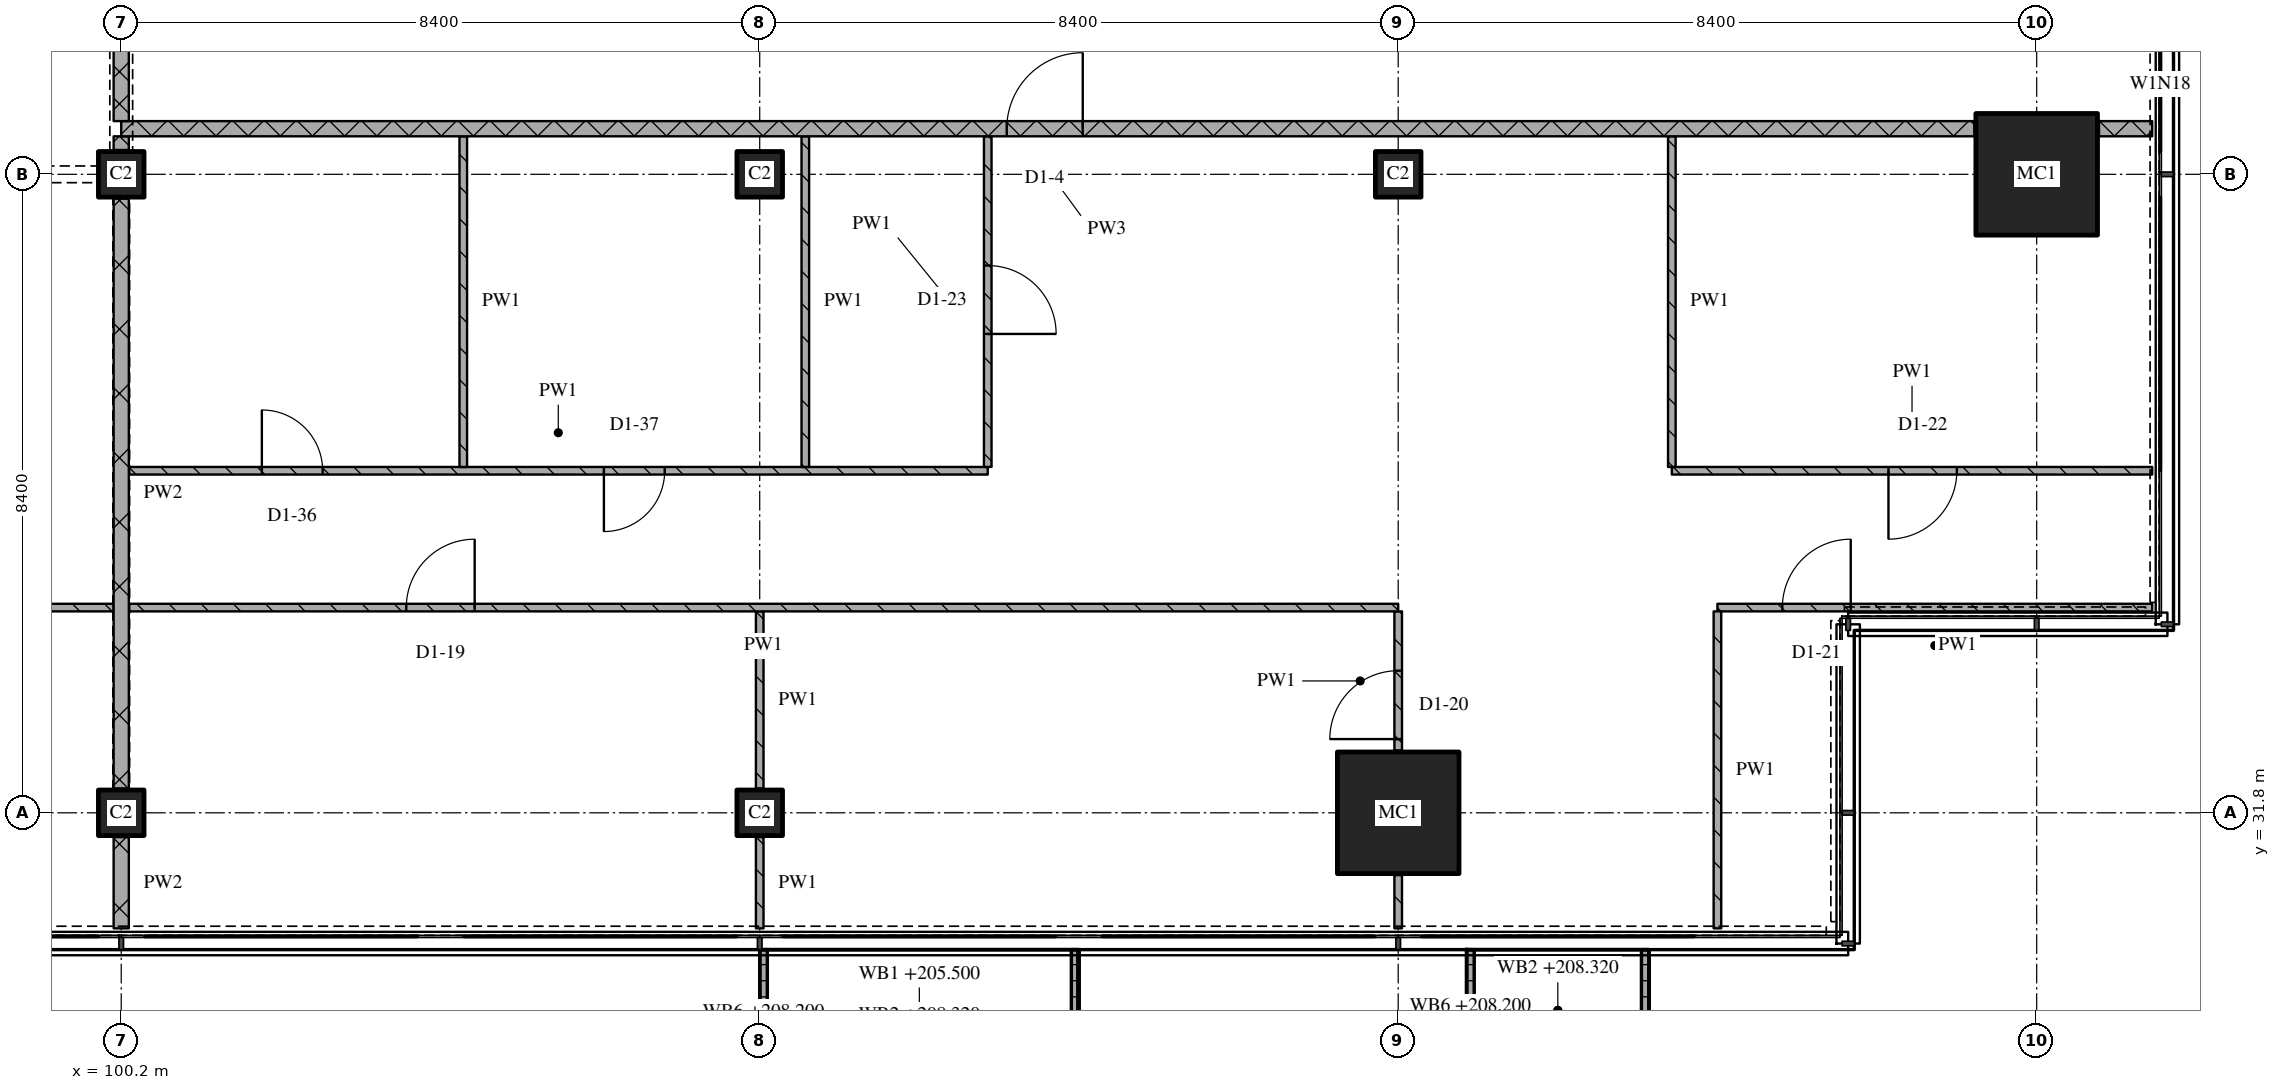
"""IFC4 building model, lengths in metres.
Left out: names, types, materials, properties, quantities, classifications, styles, units other than length and angle.
Written with IfcOpenShell. Run it as: python <this file> out.ifc"""

import sys

from ifc_helpers import new_model, si_unit, direction, frame, frame_2d, origin, origin_2d, place, context, subcontext, project, spatial, polyline, rectangle, outline, extrude, element, fill, save


model = new_model("IFC4")
c1 = context("Model", 3, precision=1e-05, world=origin(), true_north=direction((0.0, 1.0)))
c2 = subcontext(c1, "Body", "Model", "MODEL_VIEW")
j1 = project(units=[si_unit("LENGTHUNIT", "METRE"), si_unit("PLANEANGLEUNIT", "RADIAN")], contexts=[c1])
p1 = place(None, origin())
s1 = spatial("IfcSite", under=j1, at=p1, CompositionType="ELEMENT")
p2 = place(p1, origin())
s2 = spatial("IfcBuilding", under=s1, at=p2, CompositionType="ELEMENT")
p3 = place(p2, frame((0.0, 0.0, 205.5)))
s3 = spatial("IfcBuildingStorey", under=s2, at=p3, CompositionType="ELEMENT", Elevation=205.5)
for number, where, z_axis, x_axis in (
    (1, (100.2, 31.8, 0.0), (0.0, 0.0, 1.0), (1.0, 0.0, 0.0)),
    (2, (100.2, 40.2, 0.0), (0.0, 0.0, 1.0), (1.0, 0.0, 0.0)),
    (3, (108.6, 31.8, 0.0), (0.0, 0.0, 1.0), (1.0, 0.0, 0.0)),
    (4, (108.6, 40.2, 0.0), (0.0, 0.0, 1.0), (1.0, 0.0, 0.0)),
):
    element("IfcColumn", number, at=place(p3, frame(where, z_axis=z_axis, x_axis=x_axis)), inside=s3, PredefinedType="COLUMN", context=c2, shape_type="SweptSolid", body=[
        extrude(rectangle(XDim=0.6, YDim=0.6, at=origin_2d()), origin(), (0.0, 0.0, 1.0), 3.6),
    ])
p4 = place(p3, frame((117.0, 31.8, 0.0), z_axis=(0.0, 0.0, 1.0), x_axis=(1.0, 0.0, 0.0)))
e5 = element("IfcColumn", 5, at=p4, inside=s3, PredefinedType="COLUMN", context=c2, shape_type="SweptSolid", body=[
    extrude(rectangle(XDim=1.6, YDim=1.6, at=origin_2d()), origin(), (0.0, 0.0, 1.0), 3.6),
])
p5 = place(p3, frame((117.0, 40.2, 0.0), z_axis=(0.0, 0.0, 1.0), x_axis=(1.0, 0.0, 0.0)))
e6 = element("IfcColumn", 6, at=p5, inside=s3, PredefinedType="COLUMN", context=c2, shape_type="SweptSolid", body=[
    extrude(rectangle(XDim=0.6, YDim=0.6, at=origin_2d()), origin(), (0.0, 0.0, 1.0), 3.6),
])
p6 = place(p3, frame((125.4, 40.2, 0.0), z_axis=(0.0, 0.0, 1.0), x_axis=(1.0, 0.0, 0.0)))
e7 = element("IfcColumn", 7, at=p6, inside=s3, PredefinedType="COLUMN", context=c2, shape_type="SweptSolid", body=[
    extrude(rectangle(XDim=1.6, YDim=1.6, at=origin_2d()), origin(), (0.0, 0.0, 1.0), 3.6),
])
p7 = place(p3, origin())
e8 = element("IfcWall", 8, at=p7, inside=s3, PredefinedType="SOLIDWALL", context=c2, shape_type="SweptSolid", body=[
    extrude(outline(polyline([(108.6, 30.0), (108.7, 30.0), (108.7, 28.367), (112.7, 28.367), (112.7, 30.0), (112.8, 30.0), (112.8, 28.267), (108.6, 28.267), (108.6, 30.0)])), origin(), (0.0, 0.0, 1.0), 1.0),
])
p8 = place(p3, origin())
e9 = element("IfcWall", 9, at=p8, inside=s3, PredefinedType="SOLIDWALL", context=c2, shape_type="SweptSolid", body=[
    extrude(outline(polyline([(117.9, 30.0), (118.0, 30.0), (118.0, 28.5), (120.2, 28.5), (120.2, 30.0), (120.3, 30.0), (120.3, 28.4), (117.9, 28.4), (117.9, 30.0)])), origin(), (0.0, 0.0, 1.0), 1.0),
])
p9 = place(p3, frame((126.92, 34.5, 0.0), z_axis=(0.0, 0.0, 1.0), x_axis=(-1.0, 0.0, 0.0)))
e10 = element("IfcWall", 10, at=p9, inside=s3, PredefinedType="PARTITIONING", context=c2, shape_type="SweptSolid", body=[
    extrude(rectangle(XDim=5.72, YDim=0.1, at=frame_2d((2.86, 0.0))), origin(), (0.0, 0.0, 1.0), 3.32),
])
p10 = place(p9, frame((3.966, 0.0, 0.0)))
e11 = element("IfcOpeningElement", 11, at=p10, cuts=e10, PredefinedType="OPENING", context=c2, shape_type="SweptSolid", body=[
    extrude(rectangle(XDim=0.9, YDim=2.1, at=frame_2d((0.45, 1.05))), frame((0.0, 0.06, 0.0), z_axis=(0.0, -1.0, 0.0), x_axis=(1.0, 0.0, 0.0)), (0.0, 0.0, 1.0), 0.12),
])
p11 = place(p3, frame((100.3, 36.3, 0.0), z_axis=(0.0, 0.0, 1.0), x_axis=(1.0, 0.0, 0.0)))
e12 = element("IfcWall", 12, at=p11, inside=s3, PredefinedType="PARTITIONING", context=c2, shape_type="SweptSolid", body=[
    extrude(rectangle(XDim=11.3, YDim=0.1, at=frame_2d((5.65, 0.0))), origin(), (0.0, 0.0, 1.0), 3.32),
])
p12 = place(p11, frame((1.75, 0.0, 0.0)))
e13 = element("IfcOpeningElement", 13, at=p12, cuts=e12, PredefinedType="OPENING", context=c2, shape_type="SweptSolid", body=[
    extrude(rectangle(XDim=0.8, YDim=2.1, at=frame_2d((0.4, 1.05))), frame((0.0, 0.06, 0.0), z_axis=(0.0, -1.0, 0.0), x_axis=(1.0, 0.0, 0.0)), (0.0, 0.0, 1.0), 0.12),
])
p13 = place(p11, frame((6.25, 0.0, 0.0)))
e14 = element("IfcOpeningElement", 14, at=p13, cuts=e12, PredefinedType="OPENING", context=c2, shape_type="SweptSolid", body=[
    extrude(rectangle(XDim=0.8, YDim=2.1, at=frame_2d((0.4, 1.05))), frame((0.0, 0.06, 0.0), z_axis=(0.0, -1.0, 0.0), x_axis=(1.0, 0.0, 0.0)), (0.0, 0.0, 1.0), 0.12),
])
p14 = place(p3, frame((120.6, 36.3, 0.0), z_axis=(0.0, 0.0, 1.0), x_axis=(1.0, 0.0, 0.0)))
e15 = element("IfcWall", 15, at=p14, inside=s3, PredefinedType="PARTITIONING", context=c2, shape_type="SweptSolid", body=[
    extrude(rectangle(XDim=6.32, YDim=0.1, at=frame_2d((3.16, 0.0))), origin(), (0.0, 0.0, 1.0), 3.32),
])
p15 = place(p14, frame((2.85, 0.0, 0.0)))
e16 = element("IfcOpeningElement", 16, at=p15, cuts=e15, PredefinedType="OPENING", context=c2, shape_type="SweptSolid", body=[
    extrude(rectangle(XDim=0.9, YDim=2.1, at=frame_2d((0.45, 1.05))), frame((0.0, 0.06, 0.0), z_axis=(0.0, -1.0, 0.0), x_axis=(1.0, 0.0, 0.0)), (0.0, 0.0, 1.0), 0.12),
])
p16 = place(p3, frame((124.58, 40.8, 0.0), z_axis=(0.0, 0.0, 1.0), x_axis=(-1.0, 0.0, 0.0)))
e17 = element("IfcWall", 17, at=p16, inside=s3, PredefinedType="PARTITIONING", context=c2, shape_type="SweptSolid", body=[
    extrude(rectangle(XDim=24.38, YDim=0.2, at=frame_2d((12.19, 0.0))), origin(), (0.0, 0.0, 1.0), 3.32),
])
p17 = place(p16, frame((11.73, 0.0, 0.0)))
e18 = element("IfcOpeningElement", 18, at=p17, cuts=e17, PredefinedType="OPENING", context=c2, shape_type="SweptSolid", body=[
    extrude(rectangle(XDim=1.0, YDim=2.1, at=frame_2d((0.5, 1.05))), frame((0.0, 0.11, 0.0), z_axis=(0.0, -1.0, 0.0), x_axis=(1.0, 0.0, 0.0)), (0.0, 0.0, 1.0), 0.22),
])
p18 = place(p3, frame((126.22, 40.8, 0.0), z_axis=(0.0, 0.0, 1.0), x_axis=(1.0, 0.0, 0.0)))
e19 = element("IfcWall", 19, at=p18, inside=s3, PredefinedType="PARTITIONING", context=c2, shape_type="SweptSolid", body=[
    extrude(rectangle(XDim=0.7, YDim=0.2, at=frame_2d((0.35, 0.0))), origin(), (0.0, 0.0, 1.0), 3.32),
])
p19 = place(p3, frame((100.2, 43.1, 0.0), z_axis=(0.0, 0.0, 1.0), x_axis=(0.0, -1.0, 0.0)))
e20 = element("IfcWall", 20, at=p19, inside=s3, PredefinedType="PARTITIONING", context=c2, shape_type="SweptSolid", body=[
    extrude(rectangle(XDim=2.2, YDim=0.2, at=frame_2d((1.1, 0.0))), origin(), (0.0, 0.0, 1.0), 2.53),
])
p20 = place(p3, frame((100.2, 31.48, 0.0), z_axis=(0.0, 0.0, 1.0), x_axis=(0.0, -1.0, 0.0)))
e21 = element("IfcWall", 21, at=p20, inside=s3, PredefinedType="PARTITIONING", context=c2, shape_type="SweptSolid", body=[
    extrude(rectangle(XDim=1.2, YDim=0.2, at=frame_2d((0.6, 0.0))), origin(), (0.0, 0.0, 1.0), 3.32),
])
p21 = place(p3, frame((100.2, 39.88, 0.0), z_axis=(0.0, 0.0, 1.0), x_axis=(0.0, -1.0, 0.0)))
e22 = element("IfcWall", 22, at=p21, inside=s3, PredefinedType="PARTITIONING", context=c2, shape_type="SweptSolid", body=[
    extrude(rectangle(XDim=7.76, YDim=0.2, at=frame_2d((3.88, 0.0))), origin(), (0.0, 0.0, 1.0), 2.72),
])
p22 = place(p3, frame((100.2, 40.7, 0.0), z_axis=(0.0, 0.0, 1.0), x_axis=(0.0, -1.0, 0.0)))
e23 = element("IfcWall", 23, at=p22, inside=s3, PredefinedType="PARTITIONING", context=c2, shape_type="SweptSolid", body=[
    extrude(rectangle(XDim=0.18, YDim=0.2, at=frame_2d((0.09, 0.0))), origin(), (0.0, 0.0, 1.0), 3.32),
])
p23 = place(p3, frame((104.7, 40.7, 0.0), z_axis=(0.0, 0.0, 1.0), x_axis=(0.0, -1.0, 0.0)))
e24 = element("IfcWall", 24, at=p23, inside=s3, PredefinedType="PARTITIONING", context=c2, shape_type="SweptSolid", body=[
    extrude(rectangle(XDim=4.35, YDim=0.1, at=frame_2d((2.175, 0.0))), origin(), (0.0, 0.0, 1.0), 3.32),
])
p24 = place(p3, frame((108.6, 31.48, 0.0), z_axis=(0.0, 0.0, 1.0), x_axis=(0.0, -1.0, 0.0)))
e25 = element("IfcWall", 25, at=p24, inside=s3, PredefinedType="PARTITIONING", context=c2, shape_type="SweptSolid", body=[
    extrude(rectangle(XDim=1.2, YDim=0.1, at=frame_2d((0.6, 0.0))), origin(), (0.0, 0.0, 1.0), 3.32),
])
p25 = place(p3, frame((108.6, 34.45, 0.0), z_axis=(0.0, 0.0, 1.0), x_axis=(0.0, -1.0, 0.0)))
e26 = element("IfcWall", 26, at=p25, inside=s3, PredefinedType="PARTITIONING", context=c2, shape_type="SweptSolid", body=[
    extrude(rectangle(XDim=2.33, YDim=0.1, at=frame_2d((1.165, 0.0))), origin(), (0.0, 0.0, 1.0), 3.32),
])
p26 = place(p3, frame((109.2, 40.7, 0.0), z_axis=(0.0, 0.0, 1.0), x_axis=(0.0, -1.0, 0.0)))
e27 = element("IfcWall", 27, at=p26, inside=s3, PredefinedType="PARTITIONING", context=c2, shape_type="SweptSolid", body=[
    extrude(rectangle(XDim=4.35, YDim=0.1, at=frame_2d((2.175, 0.0))), origin(), (0.0, 0.0, 1.0), 3.32),
])
p27 = place(p3, frame((111.6, 36.35, 0.0), z_axis=(0.0, 0.0, 1.0), x_axis=(0.0, 1.0, 0.0)))
e28 = element("IfcWall", 28, at=p27, inside=s3, PredefinedType="PARTITIONING", context=c2, shape_type="SweptSolid", body=[
    extrude(rectangle(XDim=4.35, YDim=0.1, at=frame_2d((2.175, 0.0))), origin(), (0.0, 0.0, 1.0), 3.32),
])
p28 = place(p27, frame((1.75, 0.0, 0.0)))
e29 = element("IfcOpeningElement", 29, at=p28, cuts=e28, PredefinedType="OPENING", context=c2, shape_type="SweptSolid", body=[
    extrude(rectangle(XDim=0.9, YDim=2.1, at=frame_2d((0.45, 1.05))), frame((0.0, 0.06, 0.0), z_axis=(0.0, -1.0, 0.0), x_axis=(1.0, 0.0, 0.0)), (0.0, 0.0, 1.0), 0.12),
])
p29 = place(p3, frame((117.0, 30.98, 0.0), z_axis=(0.0, 0.0, 1.0), x_axis=(0.0, -1.0, 0.0)))
e30 = element("IfcWall", 30, at=p29, inside=s3, PredefinedType="PARTITIONING", context=c2, shape_type="SweptSolid", body=[
    extrude(rectangle(XDim=0.7, YDim=0.1, at=frame_2d((0.35, 0.0))), origin(), (0.0, 0.0, 1.0), 3.32),
])
p30 = place(p3, frame((117.0, 32.62, 0.0), z_axis=(0.0, 0.0, 1.0), x_axis=(0.0, 1.0, 0.0)))
e31 = element("IfcWall", 31, at=p30, inside=s3, PredefinedType="PARTITIONING", context=c2, shape_type="SweptSolid", body=[
    extrude(rectangle(XDim=1.83, YDim=0.1, at=frame_2d((0.915, 0.0))), origin(), (0.0, 0.0, 1.0), 3.32),
])
p31 = place(p30, frame((0.15, 0.0, 0.0)))
e32 = element("IfcOpeningElement", 32, at=p31, cuts=e31, PredefinedType="OPENING", context=c2, shape_type="SweptSolid", body=[
    extrude(rectangle(XDim=0.9, YDim=2.1, at=frame_2d((0.45, 1.05))), frame((0.0, 0.06, 0.0), z_axis=(0.0, -1.0, 0.0), x_axis=(1.0, 0.0, 0.0)), (0.0, 0.0, 1.0), 0.12),
])
p32 = place(p3, frame((120.6, 40.7, 0.0), z_axis=(0.0, 0.0, 1.0), x_axis=(0.0, -1.0, 0.0)))
e33 = element("IfcWall", 33, at=p32, inside=s3, PredefinedType="PARTITIONING", context=c2, shape_type="SweptSolid", body=[
    extrude(rectangle(XDim=4.35, YDim=0.1, at=frame_2d((2.175, 0.0))), origin(), (0.0, 0.0, 1.0), 3.32),
])
p33 = place(p3, frame((121.2, 34.45, 0.0), z_axis=(0.0, 0.0, 1.0), x_axis=(0.0, -1.0, 0.0)))
e34 = element("IfcWall", 34, at=p33, inside=s3, PredefinedType="PARTITIONING", context=c2, shape_type="SweptSolid", body=[
    extrude(rectangle(XDim=4.17, YDim=0.1, at=frame_2d((2.085, 0.0))), origin(), (0.0, 0.0, 1.0), 3.32),
])
p34 = place(p3, frame((100.1, 34.5, 0.0), z_axis=(0.0, 0.0, 1.0), x_axis=(-1.0, 0.0, 0.0)))
e35 = element("IfcWall", 35, at=p34, inside=s3, PredefinedType="PARTITIONING", context=c2, shape_type="SweptSolid", body=[
    extrude(rectangle(XDim=4.1, YDim=0.1, at=frame_2d((2.05, 0.0))), origin(), (0.0, 0.0, 1.0), 3.32),
])
p35 = place(p34, frame((1.55, 0.0, 0.0)))
e36 = element("IfcOpeningElement", 36, at=p35, cuts=e35, PredefinedType="OPENING", context=c2, shape_type="SweptSolid", body=[
    extrude(rectangle(XDim=0.9, YDim=2.1, at=frame_2d((0.45, 1.05))), frame((0.0, 0.06, 0.0), z_axis=(0.0, -1.0, 0.0), x_axis=(1.0, 0.0, 0.0)), (0.0, 0.0, 1.0), 0.12),
])
p36 = place(p3, frame((117.0, 34.5, 0.0), z_axis=(0.0, 0.0, 1.0), x_axis=(-1.0, 0.0, 0.0)))
e37 = element("IfcWall", 37, at=p36, inside=s3, PredefinedType="PARTITIONING", context=c2, shape_type="SweptSolid", body=[
    extrude(rectangle(XDim=16.7, YDim=0.1, at=frame_2d((8.35, 0.0))), origin(), (0.0, 0.0, 1.0), 3.32),
])
p37 = place(p36, frame((12.15, 0.0, 0.0)))
e38 = element("IfcOpeningElement", 38, at=p37, cuts=e37, PredefinedType="OPENING", context=c2, shape_type="SweptSolid", body=[
    extrude(rectangle(XDim=0.9, YDim=2.1, at=frame_2d((0.45, 1.05))), frame((0.0, 0.06, 0.0), z_axis=(0.0, -1.0, 0.0), x_axis=(1.0, 0.0, 0.0)), (0.0, 0.0, 1.0), 0.12),
])
p38 = place(p10, origin())
e39 = element("IfcDoor", 39, at=p38, inside=s3, OperationType="SINGLE_SWING_RIGHT", PredefinedType="DOOR", context=c2, shape_type="SweptSolid", body=[
    extrude(rectangle(XDim=0.9, YDim=2.1, at=frame_2d((0.45, 1.05))), frame((0.0, 0.025, 0.0), z_axis=(0.0, -1.0, 0.0), x_axis=(1.0, 0.0, 0.0)), (0.0, 0.0, 1.0), 0.05),
])
fill(e11, e39)
p39 = place(p12, origin())
e40 = element("IfcDoor", 40, at=p39, inside=s3, OperationType="SINGLE_SWING_LEFT", PredefinedType="DOOR", context=c2, shape_type="SweptSolid", body=[
    extrude(rectangle(XDim=0.8, YDim=2.1, at=frame_2d((0.4, 1.05))), frame((0.0, 0.025, 0.0), z_axis=(0.0, -1.0, 0.0), x_axis=(1.0, 0.0, 0.0)), (0.0, 0.0, 1.0), 0.05),
])
fill(e13, e40)
p40 = place(p13, origin())
e41 = element("IfcDoor", 41, at=p40, inside=s3, OperationType="SINGLE_SWING_RIGHT", PredefinedType="DOOR", context=c2, shape_type="SweptSolid", body=[
    extrude(rectangle(XDim=0.8, YDim=2.1, at=frame_2d((0.4, 1.05))), frame((0.0, 0.025, 0.0), z_axis=(0.0, -1.0, 0.0), x_axis=(1.0, 0.0, 0.0)), (0.0, 0.0, 1.0), 0.05),
])
fill(e14, e41)
p41 = place(p15, origin())
e42 = element("IfcDoor", 42, at=p41, inside=s3, OperationType="SINGLE_SWING_RIGHT", PredefinedType="DOOR", context=c2, shape_type="SweptSolid", body=[
    extrude(rectangle(XDim=0.9, YDim=2.1, at=frame_2d((0.45, 1.05))), frame((0.0, 0.025, 0.0), z_axis=(0.0, -1.0, 0.0), x_axis=(1.0, 0.0, 0.0)), (0.0, 0.0, 1.0), 0.05),
])
fill(e16, e42)
p42 = place(p17, origin())
e43 = element("IfcDoor", 43, at=p42, inside=s3, OperationType="SINGLE_SWING_RIGHT", PredefinedType="DOOR", context=c2, shape_type="SweptSolid", body=[
    extrude(rectangle(XDim=1.0, YDim=2.1, at=frame_2d((0.5, 1.05))), frame((0.0, 0.025, 0.0), z_axis=(0.0, -1.0, 0.0), x_axis=(1.0, 0.0, 0.0)), (0.0, 0.0, 1.0), 0.05),
])
fill(e18, e43)
p43 = place(p28, origin())
e44 = element("IfcDoor", 44, at=p43, inside=s3, OperationType="SINGLE_SWING_RIGHT", PredefinedType="DOOR", context=c2, shape_type="SweptSolid", body=[
    extrude(rectangle(XDim=0.9, YDim=2.1, at=frame_2d((0.45, 1.05))), frame((0.0, 0.025, 0.0), z_axis=(0.0, -1.0, 0.0), x_axis=(1.0, 0.0, 0.0)), (0.0, 0.0, 1.0), 0.05),
])
fill(e29, e44)
p44 = place(p31, origin())
e45 = element("IfcDoor", 45, at=p44, inside=s3, OperationType="SINGLE_SWING_LEFT", PredefinedType="DOOR", context=c2, shape_type="SweptSolid", body=[
    extrude(rectangle(XDim=0.9, YDim=2.1, at=frame_2d((0.45, 1.05))), frame((0.0, 0.025, 0.0), z_axis=(0.0, -1.0, 0.0), x_axis=(1.0, 0.0, 0.0)), (0.0, 0.0, 1.0), 0.05),
])
fill(e32, e45)
p45 = place(p37, origin())
e46 = element("IfcDoor", 46, at=p45, inside=s3, OperationType="SINGLE_SWING_RIGHT", PredefinedType="DOOR", context=c2, shape_type="SweptSolid", body=[
    extrude(rectangle(XDim=0.9, YDim=2.1, at=frame_2d((0.45, 1.05))), frame((0.0, 0.025, 0.0), z_axis=(0.0, -1.0, 0.0), x_axis=(1.0, 0.0, 0.0)), (0.0, 0.0, 1.0), 0.05),
])
fill(e38, e46)
save(model, sys.argv[1])
